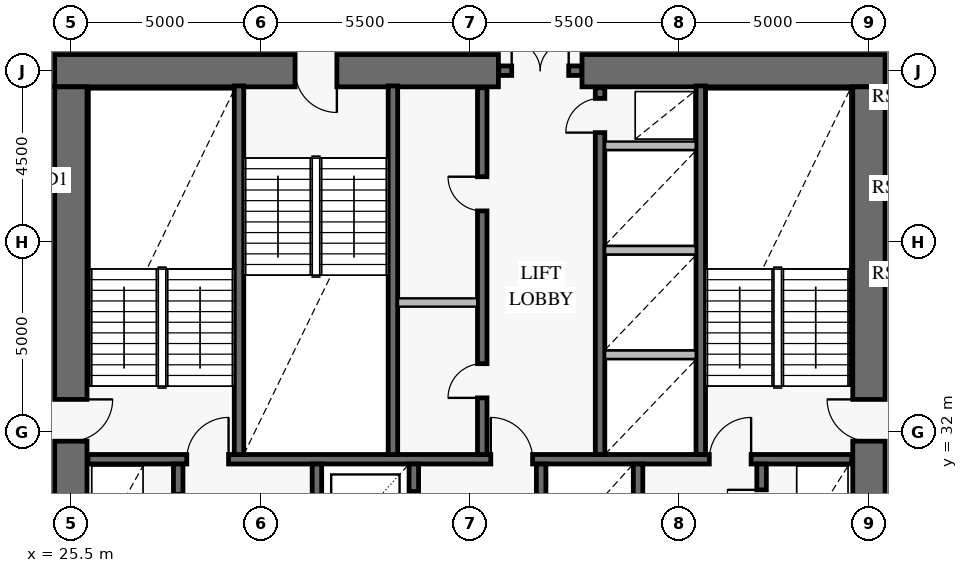
"""IFC4 building model, lengths in metres.
Left out: names, types, materials, properties, quantities, classifications, styles, units other than length and angle.
Written with IfcOpenShell. Run it as: python <this file> out.ifc"""

import sys

from ifc_helpers import new_model, si_unit, direction, frame, frame_2d, origin, place, context, subcontext, project, spatial, rectangle, extrude, element, fill, save


model = new_model("IFC4")
c1 = context("Model", 3, precision=1e-05, world=origin(), true_north=direction((0.0, 1.0)))
c2 = subcontext(c1, "Body", "Model", "MODEL_VIEW")
j1 = project(units=[si_unit("LENGTHUNIT", "METRE"), si_unit("PLANEANGLEUNIT", "RADIAN")], contexts=[c1])
p1 = place(None, origin())
s1 = spatial("IfcSite", under=j1, at=p1, CompositionType="ELEMENT")
p2 = place(p1, origin())
s2 = spatial("IfcBuilding", under=s1, at=p2, CompositionType="ELEMENT")
p3 = place(p2, frame((0.0, 0.0, 41.4)))
s3 = spatial("IfcBuildingStorey", under=s2, at=p3, CompositionType="ELEMENT", Elevation=41.4)
p4 = place(p3, frame((46.925, 41.5, 0.0), z_axis=(0.0, 0.0, 1.0), x_axis=(-1.0, 0.0, 0.0)))
e1 = element("IfcWall", 1, at=p4, inside=s3, PredefinedType="SHEAR", context=c2, shape_type="SweptSolid", body=[
    extrude(rectangle(XDim=7.975, YDim=0.85, at=frame_2d((3.988, 0.0))), origin(), (0.0, 0.0, 1.0), 4.2),
])
p5 = place(p3, frame((36.75, 41.5, 0.0), z_axis=(0.0, 0.0, 1.0), x_axis=(-1.0, 0.0, 0.0)))
e2 = element("IfcWall", 2, at=p5, inside=s3, PredefinedType="SHEAR", context=c2, shape_type="SweptSolid", body=[
    extrude(rectangle(XDim=11.675, YDim=0.85, at=frame_2d((5.837, 0.0))), origin(), (0.0, 0.0, 1.0), 4.2),
])
p6 = place(p5, frame((4.25, 0.0, 0.0)))
e3 = element("IfcOpeningElement", 3, at=p6, cuts=e2, PredefinedType="OPENING", context=c2, shape_type="SweptSolid", body=[
    extrude(rectangle(XDim=1.1, YDim=2.15, at=frame_2d((0.55, 1.075))), frame((0.0, 0.437, 0.0), z_axis=(0.0, -1.0, 0.0), x_axis=(1.0, 0.0, 0.0)), (0.0, 0.0, 1.0), 0.874),
])
p7 = place(p3, frame((25.5, 22.925, 0.0), z_axis=(0.0, 0.0, 1.0), x_axis=(0.0, 1.0, 0.0)))
e4 = element("IfcWall", 4, at=p7, inside=s3, PredefinedType="SHEAR", context=c2, shape_type="SweptSolid", body=[
    extrude(rectangle(XDim=18.15, YDim=0.85, at=frame_2d((9.075, 0.0))), origin(), (0.0, 0.0, 1.0), 4.2),
])
p8 = place(p7, frame((8.825, 0.0, 0.0)))
e5 = element("IfcOpeningElement", 5, at=p8, cuts=e4, PredefinedType="OPENING", context=c2, shape_type="SweptSolid", body=[
    extrude(rectangle(XDim=1.1, YDim=2.15, at=frame_2d((0.55, 1.075))), frame((0.0, 0.437, 0.0), z_axis=(0.0, -1.0, 0.0), x_axis=(1.0, 0.0, 0.0)), (0.0, 0.0, 1.0), 0.874),
])
p9 = place(p3, frame((46.5, 22.925, 0.0), z_axis=(0.0, 0.0, 1.0), x_axis=(0.0, 1.0, 0.0)))
e6 = element("IfcWall", 6, at=p9, inside=s3, PredefinedType="SHEAR", context=c2, shape_type="SweptSolid", body=[
    extrude(rectangle(XDim=18.15, YDim=0.85, at=frame_2d((9.075, 0.0))), origin(), (0.0, 0.0, 1.0), 4.2),
])
p10 = place(p9, frame((8.825, 0.0, 0.0)))
e7 = element("IfcOpeningElement", 7, at=p10, cuts=e6, PredefinedType="OPENING", context=c2, shape_type="SweptSolid", body=[
    extrude(rectangle(XDim=1.1, YDim=2.15, at=frame_2d((0.55, 1.075))), frame((0.0, 0.437, 0.0), z_axis=(0.0, -1.0, 0.0), x_axis=(1.0, 0.0, 0.0)), (0.0, 0.0, 1.0), 0.874),
])
p11 = place(p3, frame((36.76, 41.5, 0.0), z_axis=(0.0, 0.0, 1.0), x_axis=(1.0, 0.0, 0.0)))
e8 = element("IfcWall", 8, at=p11, inside=s3, PredefinedType="SOLIDWALL", context=c2, shape_type="SweptSolid", body=[
    extrude(rectangle(XDim=2.18, YDim=0.25, at=frame_2d((1.09, 0.0))), origin(), (0.0, 0.0, 1.0), 4.2),
])
p12 = place(p11, frame((0.34, 0.0, 0.0)))
e9 = element("IfcOpeningElement", 9, at=p12, cuts=e8, PredefinedType="OPENING", context=c2, shape_type="SweptSolid", body=[
    extrude(rectangle(XDim=1.5, YDim=2.15, at=frame_2d((0.75, 1.075))), frame((0.0, 0.137, 0.0), z_axis=(0.0, -1.0, 0.0), x_axis=(1.0, 0.0, 0.0)), (0.0, 0.0, 1.0), 0.274),
])
p13 = place(p3, frame((25.95, 31.275, 0.0), z_axis=(0.0, 0.0, 1.0), x_axis=(1.0, 0.0, 0.0)))
e10 = element("IfcWall", 10, at=p13, inside=s3, PredefinedType="SOLIDWALL", context=c2, shape_type="SweptSolid", body=[
    extrude(rectangle(XDim=20.1, YDim=0.25, at=frame_2d((10.05, 0.0))), origin(), (0.0, 0.0, 1.0), 4.2),
])
p14 = place(p13, frame((2.6, 0.0, 0.0)))
e11 = element("IfcOpeningElement", 11, at=p14, cuts=e10, PredefinedType="OPENING", context=c2, shape_type="SweptSolid", body=[
    extrude(rectangle(XDim=1.1, YDim=2.15, at=frame_2d((0.55, 1.075))), frame((0.0, 0.137, 0.0), z_axis=(0.0, -1.0, 0.0), x_axis=(1.0, 0.0, 0.0)), (0.0, 0.0, 1.0), 0.274),
])
p15 = place(p13, frame((10.6, 0.0, 0.0)))
e12 = element("IfcOpeningElement", 12, at=p15, cuts=e10, PredefinedType="OPENING", context=c2, shape_type="SweptSolid", body=[
    extrude(rectangle(XDim=1.1, YDim=2.15, at=frame_2d((0.55, 1.075))), frame((0.0, 0.137, 0.0), z_axis=(0.0, -1.0, 0.0), x_axis=(1.0, 0.0, 0.0)), (0.0, 0.0, 1.0), 0.274),
])
p16 = place(p13, frame((16.35, 0.0, 0.0)))
e13 = element("IfcOpeningElement", 13, at=p16, cuts=e10, PredefinedType="OPENING", context=c2, shape_type="SweptSolid", body=[
    extrude(rectangle(XDim=1.1, YDim=2.15, at=frame_2d((0.55, 1.075))), frame((0.0, 0.137, 0.0), z_axis=(0.0, -1.0, 0.0), x_axis=(1.0, 0.0, 0.0)), (0.0, 0.0, 1.0), 0.274),
])
for number, where, z_axis, x_axis in (
    (14, (29.925, 31.4, 0.0), (0.0, 0.0, 1.0), (0.0, 1.0, 0.0)),
    (15, (33.975, 31.4, 0.0), (0.0, 0.0, 1.0), (0.0, 1.0, 0.0)),
    (16, (42.075, 31.4, 0.0), (0.0, 0.0, 1.0), (0.0, 1.0, 0.0)),
):
    element("IfcWall", number, at=place(p3, frame(where, z_axis=z_axis, x_axis=x_axis)), inside=s3, PredefinedType="SOLIDWALL", context=c2, shape_type="SweptSolid", body=[
        extrude(rectangle(XDim=9.7, YDim=0.25, at=frame_2d((4.85, 0.0))), origin(), (0.0, 0.0, 1.0), 4.2),
    ])
p17 = place(p3, frame((36.325, 31.4, 0.0), z_axis=(0.0, 0.0, 1.0), x_axis=(0.0, 1.0, 0.0)))
e17 = element("IfcWall", 17, at=p17, inside=s3, PredefinedType="SOLIDWALL", context=c2, shape_type="SweptSolid", body=[
    extrude(rectangle(XDim=9.65, YDim=0.25, at=frame_2d((4.825, 0.0))), origin(), (0.0, 0.0, 1.0), 4.2),
])
p18 = place(p17, frame((1.49, 0.0, 0.0)))
e18 = element("IfcOpeningElement", 18, at=p18, cuts=e17, PredefinedType="OPENING", context=c2, shape_type="SweptSolid", body=[
    extrude(rectangle(XDim=0.9, YDim=2.1, at=frame_2d((0.45, 1.05))), frame((0.0, 0.137, 0.0), z_axis=(0.0, -1.0, 0.0), x_axis=(1.0, 0.0, 0.0)), (0.0, 0.0, 1.0), 0.274),
])
p19 = place(p17, frame((6.41, 0.0, 0.0)))
e19 = element("IfcOpeningElement", 19, at=p19, cuts=e17, PredefinedType="OPENING", context=c2, shape_type="SweptSolid", body=[
    extrude(rectangle(XDim=0.9, YDim=2.1, at=frame_2d((0.45, 1.05))), frame((0.0, 0.137, 0.0), z_axis=(0.0, -1.0, 0.0), x_axis=(1.0, 0.0, 0.0)), (0.0, 0.0, 1.0), 0.274),
])
p20 = place(p3, frame((39.425, 31.4, 0.0), z_axis=(0.0, 0.0, 1.0), x_axis=(0.0, 1.0, 0.0)))
e20 = element("IfcWall", 20, at=p20, inside=s3, PredefinedType="SOLIDWALL", context=c2, shape_type="SweptSolid", body=[
    extrude(rectangle(XDim=9.65, YDim=0.25, at=frame_2d((4.825, 0.0))), origin(), (0.0, 0.0, 1.0), 4.2),
])
p21 = place(p20, frame((8.47, 0.0, 0.0)))
e21 = element("IfcOpeningElement", 21, at=p21, cuts=e20, PredefinedType="OPENING", context=c2, shape_type="SweptSolid", body=[
    extrude(rectangle(XDim=0.9, YDim=2.1, at=frame_2d((0.45, 1.05))), frame((0.0, 0.137, 0.0), z_axis=(0.0, -1.0, 0.0), x_axis=(1.0, 0.0, 0.0)), (0.0, 0.0, 1.0), 0.274),
])
p22 = place(p3, frame((28.325, 22.95, 0.0), z_axis=(0.0, 0.0, 1.0), x_axis=(0.0, 1.0, 0.0)))
e22 = element("IfcWall", 22, at=p22, inside=s3, PredefinedType="SOLIDWALL", context=c2, shape_type="SweptSolid", body=[
    extrude(rectangle(XDim=8.2, YDim=0.25, at=frame_2d((4.1, 0.0))), origin(), (0.0, 0.0, 1.0), 4.2),
])
p23 = place(p22, frame((0.75, 0.0, 0.0)))
e23 = element("IfcOpeningElement", 23, at=p23, cuts=e22, PredefinedType="OPENING", context=c2, shape_type="SweptSolid", body=[
    extrude(rectangle(XDim=1.3, YDim=2.3, at=frame_2d((0.65, 1.15))), frame((0.0, 0.137, 0.0), z_axis=(0.0, -1.0, 0.0), x_axis=(1.0, 0.0, 0.0)), (0.0, 0.0, 1.0), 0.274),
])
p24 = place(p22, frame((3.78, 0.0, 0.0)))
e24 = element("IfcOpeningElement", 24, at=p24, cuts=e22, PredefinedType="OPENING", context=c2, shape_type="SweptSolid", body=[
    extrude(rectangle(XDim=0.9, YDim=2.1, at=frame_2d((0.45, 1.05))), frame((0.0, 0.137, 0.0), z_axis=(0.0, -1.0, 0.0), x_axis=(1.0, 0.0, 0.0)), (0.0, 0.0, 1.0), 0.274),
])
p25 = place(p22, frame((6.5, 0.0, 0.0)))
e25 = element("IfcOpeningElement", 25, at=p25, cuts=e22, PredefinedType="OPENING", context=c2, shape_type="SweptSolid", body=[
    extrude(rectangle(XDim=0.9, YDim=2.1, at=frame_2d((0.45, 1.05))), frame((0.0, 0.137, 0.0), z_axis=(0.0, -1.0, 0.0), x_axis=(1.0, 0.0, 0.0)), (0.0, 0.0, 1.0), 0.274),
])
p26 = place(p3, frame((31.975, 22.95, 0.0), z_axis=(0.0, 0.0, 1.0), x_axis=(0.0, 1.0, 0.0)))
e26 = element("IfcWall", 26, at=p26, inside=s3, PredefinedType="SOLIDWALL", context=c2, shape_type="SweptSolid", body=[
    extrude(rectangle(XDim=8.2, YDim=0.25, at=frame_2d((4.1, 0.0))), origin(), (0.0, 0.0, 1.0), 4.2),
])
p27 = place(p3, frame((34.525, 22.95, 0.0), z_axis=(0.0, 0.0, 1.0), x_axis=(0.0, 1.0, 0.0)))
e27 = element("IfcWall", 27, at=p27, inside=s3, PredefinedType="SOLIDWALL", context=c2, shape_type="SweptSolid", body=[
    extrude(rectangle(XDim=8.2, YDim=0.25, at=frame_2d((4.1, 0.0))), origin(), (0.0, 0.0, 1.0), 4.2),
])
p28 = place(p27, frame((0.775, 0.0, 0.0)))
e28 = element("IfcOpeningElement", 28, at=p28, cuts=e27, PredefinedType="OPENING", context=c2, shape_type="SweptSolid", body=[
    extrude(rectangle(XDim=1.1, YDim=2.2, at=frame_2d((0.55, 1.1))), frame((0.0, 0.137, 0.0), z_axis=(0.0, -1.0, 0.0), x_axis=(1.0, 0.0, 0.0)), (0.0, 0.0, 1.0), 0.274),
])
p29 = place(p27, frame((3.575, 0.0, 0.0)))
e29 = element("IfcOpeningElement", 29, at=p29, cuts=e27, PredefinedType="OPENING", context=c2, shape_type="SweptSolid", body=[
    extrude(rectangle(XDim=1.1, YDim=2.2, at=frame_2d((0.55, 1.1))), frame((0.0, 0.137, 0.0), z_axis=(0.0, -1.0, 0.0), x_axis=(1.0, 0.0, 0.0)), (0.0, 0.0, 1.0), 0.274),
])
p30 = place(p27, frame((6.375, 0.0, 0.0)))
e30 = element("IfcOpeningElement", 30, at=p30, cuts=e27, PredefinedType="OPENING", context=c2, shape_type="SweptSolid", body=[
    extrude(rectangle(XDim=1.1, YDim=2.2, at=frame_2d((0.55, 1.1))), frame((0.0, 0.137, 0.0), z_axis=(0.0, -1.0, 0.0), x_axis=(1.0, 0.0, 0.0)), (0.0, 0.0, 1.0), 0.274),
])
for number, where, z_axis, x_axis in (
    (31, (37.875, 22.95, 0.0), (0.0, 0.0, 1.0), (0.0, 1.0, 0.0)),
    (32, (40.425, 22.95, 0.0), (0.0, 0.0, 1.0), (0.0, 1.0, 0.0)),
):
    element("IfcWall", number, at=place(p3, frame(where, z_axis=z_axis, x_axis=x_axis)), inside=s3, PredefinedType="SOLIDWALL", context=c2, shape_type="SweptSolid", body=[
        extrude(rectangle(XDim=8.2, YDim=0.25, at=frame_2d((4.1, 0.0))), origin(), (0.0, 0.0, 1.0), 4.2),
    ])
p31 = place(p3, frame((43.675, 22.95, 0.0), z_axis=(0.0, 0.0, 1.0), x_axis=(0.0, 1.0, 0.0)))
e33 = element("IfcWall", 33, at=p31, inside=s3, PredefinedType="SOLIDWALL", context=c2, shape_type="SweptSolid", body=[
    extrude(rectangle(XDim=8.2, YDim=0.25, at=frame_2d((4.1, 0.0))), origin(), (0.0, 0.0, 1.0), 4.2),
])
p32 = place(p31, frame((0.75, 0.0, 0.0)))
e34 = element("IfcOpeningElement", 34, at=p32, cuts=e33, PredefinedType="OPENING", context=c2, shape_type="SweptSolid", body=[
    extrude(rectangle(XDim=1.3, YDim=2.3, at=frame_2d((0.65, 1.15))), frame((0.0, 0.137, 0.0), z_axis=(0.0, -1.0, 0.0), x_axis=(1.0, 0.0, 0.0)), (0.0, 0.0, 1.0), 0.274),
])
p33 = place(p31, frame((3.7, 0.0, 0.0)))
e35 = element("IfcOpeningElement", 35, at=p33, cuts=e33, PredefinedType="OPENING", context=c2, shape_type="SweptSolid", body=[
    extrude(rectangle(XDim=1.3, YDim=2.3, at=frame_2d((0.65, 1.15))), frame((0.0, 0.137, 0.0), z_axis=(0.0, -1.0, 0.0), x_axis=(1.0, 0.0, 0.0)), (0.0, 0.0, 1.0), 0.274),
])
p34 = place(p31, frame((6.62, 0.0, 0.0)))
e36 = element("IfcOpeningElement", 36, at=p34, cuts=e33, PredefinedType="OPENING", context=c2, shape_type="SweptSolid", body=[
    extrude(rectangle(XDim=0.9, YDim=2.1, at=frame_2d((0.45, 1.05))), frame((0.0, 0.137, 0.0), z_axis=(0.0, -1.0, 0.0), x_axis=(1.0, 0.0, 0.0)), (0.0, 0.0, 1.0), 0.274),
])
p35 = place(p3, frame((34.108, 35.4, 0.0), z_axis=(0.0, 0.0, 1.0), x_axis=(1.0, 0.0, 0.0)))
e37 = element("IfcWall", 37, at=p35, inside=s3, PredefinedType="PARTITIONING", context=c2, shape_type="SweptSolid", body=[
    extrude(rectangle(XDim=2.084, YDim=0.22, at=frame_2d((1.042, 0.0))), origin(), (0.0, 0.0, 1.0), 3.92),
])
for number, where, z_axis, x_axis in (
    (38, (39.558, 34.025, 0.0), (0.0, 0.0, 1.0), (1.0, 0.0, 0.0)),
    (39, (39.558, 36.775, 0.0), (0.0, 0.0, 1.0), (1.0, 0.0, 0.0)),
    (40, (39.558, 39.525, 0.0), (0.0, 0.0, 1.0), (1.0, 0.0, 0.0)),
):
    element("IfcWall", number, at=place(p3, frame(where, z_axis=z_axis, x_axis=x_axis)), inside=s3, PredefinedType="PARTITIONING", context=c2, shape_type="SweptSolid", body=[
        extrude(rectangle(XDim=2.384, YDim=0.22, at=frame_2d((1.192, 0.0))), origin(), (0.0, 0.0, 1.0), 3.92),
    ])
p36 = place(p8, frame((1.1, 0.0, 0.0), z_axis=(0.0, 0.0, 1.0), x_axis=(-1.0, 0.0, 0.0)))
e41 = element("IfcDoor", 41, at=p36, inside=s3, OperationType="SINGLE_SWING_LEFT", PredefinedType="USERDEFINED", context=c2, shape_type="SweptSolid", body=[
    extrude(rectangle(XDim=1.1, YDim=2.15, at=frame_2d((0.55, 1.075))), frame((0.0, 0.025, 0.0), z_axis=(0.0, -1.0, 0.0), x_axis=(1.0, 0.0, 0.0)), (0.0, 0.0, 1.0), 0.05),
])
fill(e5, e41)
p37 = place(p10, origin())
e42 = element("IfcDoor", 42, at=p37, inside=s3, OperationType="SINGLE_SWING_RIGHT", PredefinedType="USERDEFINED", context=c2, shape_type="SweptSolid", body=[
    extrude(rectangle(XDim=1.1, YDim=2.15, at=frame_2d((0.55, 1.075))), frame((0.0, 0.025, 0.0), z_axis=(0.0, -1.0, 0.0), x_axis=(1.0, 0.0, 0.0)), (0.0, 0.0, 1.0), 0.05),
])
fill(e7, e42)
p38 = place(p6, origin())
e43 = element("IfcDoor", 43, at=p38, inside=s3, OperationType="SINGLE_SWING_LEFT", PredefinedType="USERDEFINED", context=c2, shape_type="SweptSolid", body=[
    extrude(rectangle(XDim=1.1, YDim=2.15, at=frame_2d((0.55, 1.075))), frame((0.0, 0.025, 0.0), z_axis=(0.0, -1.0, 0.0), x_axis=(1.0, 0.0, 0.0)), (0.0, 0.0, 1.0), 0.05),
])
fill(e3, e43)
p39 = place(p12, origin())
e44 = element("IfcDoor", 44, at=p39, inside=s3, OperationType="DOUBLE_DOOR_SINGLE_SWING", PredefinedType="DOOR", context=c2, shape_type="SweptSolid", body=[
    extrude(rectangle(XDim=1.5, YDim=2.15, at=frame_2d((0.75, 1.075))), frame((0.0, 0.025, 0.0), z_axis=(0.0, -1.0, 0.0), x_axis=(1.0, 0.0, 0.0)), (0.0, 0.0, 1.0), 0.05),
])
fill(e9, e44)
p40 = place(p14, origin())
e45 = element("IfcDoor", 45, at=p40, inside=s3, OperationType="SINGLE_SWING_RIGHT", PredefinedType="USERDEFINED", context=c2, shape_type="SweptSolid", body=[
    extrude(rectangle(XDim=1.1, YDim=2.15, at=frame_2d((0.55, 1.075))), frame((0.0, 0.025, 0.0), z_axis=(0.0, -1.0, 0.0), x_axis=(1.0, 0.0, 0.0)), (0.0, 0.0, 1.0), 0.05),
])
fill(e11, e45)
p41 = place(p15, origin())
e46 = element("IfcDoor", 46, at=p41, inside=s3, OperationType="SINGLE_SWING_LEFT", PredefinedType="USERDEFINED", context=c2, shape_type="SweptSolid", body=[
    extrude(rectangle(XDim=1.1, YDim=2.15, at=frame_2d((0.55, 1.075))), frame((0.0, 0.025, 0.0), z_axis=(0.0, -1.0, 0.0), x_axis=(1.0, 0.0, 0.0)), (0.0, 0.0, 1.0), 0.05),
])
fill(e12, e46)
p42 = place(p16, origin())
e47 = element("IfcDoor", 47, at=p42, inside=s3, OperationType="SINGLE_SWING_RIGHT", PredefinedType="USERDEFINED", context=c2, shape_type="SweptSolid", body=[
    extrude(rectangle(XDim=1.1, YDim=2.15, at=frame_2d((0.55, 1.075))), frame((0.0, 0.025, 0.0), z_axis=(0.0, -1.0, 0.0), x_axis=(1.0, 0.0, 0.0)), (0.0, 0.0, 1.0), 0.05),
])
fill(e13, e47)
p43 = place(p18, origin())
e48 = element("IfcDoor", 48, at=p43, inside=s3, OperationType="SINGLE_SWING_LEFT", PredefinedType="DOOR", context=c2, shape_type="SweptSolid", body=[
    extrude(rectangle(XDim=0.9, YDim=2.1, at=frame_2d((0.45, 1.05))), frame((0.0, 0.025, 0.0), z_axis=(0.0, -1.0, 0.0), x_axis=(1.0, 0.0, 0.0)), (0.0, 0.0, 1.0), 0.05),
])
fill(e18, e48)
p44 = place(p19, origin())
e49 = element("IfcDoor", 49, at=p44, inside=s3, OperationType="SINGLE_SWING_RIGHT", PredefinedType="DOOR", context=c2, shape_type="SweptSolid", body=[
    extrude(rectangle(XDim=0.9, YDim=2.1, at=frame_2d((0.45, 1.05))), frame((0.0, 0.025, 0.0), z_axis=(0.0, -1.0, 0.0), x_axis=(1.0, 0.0, 0.0)), (0.0, 0.0, 1.0), 0.05),
])
fill(e19, e49)
p45 = place(p21, origin())
e50 = element("IfcDoor", 50, at=p45, inside=s3, OperationType="SINGLE_SWING_LEFT", PredefinedType="DOOR", context=c2, shape_type="SweptSolid", body=[
    extrude(rectangle(XDim=0.9, YDim=2.1, at=frame_2d((0.45, 1.05))), frame((0.0, 0.025, 0.0), z_axis=(0.0, -1.0, 0.0), x_axis=(1.0, 0.0, 0.0)), (0.0, 0.0, 1.0), 0.05),
])
fill(e21, e50)
p46 = place(p30, frame((1.1, 0.0, 0.0), z_axis=(0.0, 0.0, 1.0), x_axis=(-1.0, 0.0, 0.0)))
e51 = element("IfcDoor", 51, at=p46, inside=s3, OperationType="DOUBLE_DOOR_SLIDING", PredefinedType="DOOR", context=c2, shape_type="SweptSolid", body=[
    extrude(rectangle(XDim=1.1, YDim=2.2, at=frame_2d((0.55, 1.1))), frame((0.0, 0.025, 0.0), z_axis=(0.0, -1.0, 0.0), x_axis=(1.0, 0.0, 0.0)), (0.0, 0.0, 1.0), 0.05),
])
fill(e30, e51)
p47 = place(p34, origin())
e52 = element("IfcDoor", 52, at=p47, inside=s3, OperationType="SINGLE_SWING_RIGHT", PredefinedType="DOOR", context=c2, shape_type="SweptSolid", body=[
    extrude(rectangle(XDim=0.9, YDim=2.1, at=frame_2d((0.45, 1.05))), frame((0.0, 0.025, 0.0), z_axis=(0.0, -1.0, 0.0), x_axis=(1.0, 0.0, 0.0)), (0.0, 0.0, 1.0), 0.05),
])
fill(e36, e52)
save(model, sys.argv[1])
